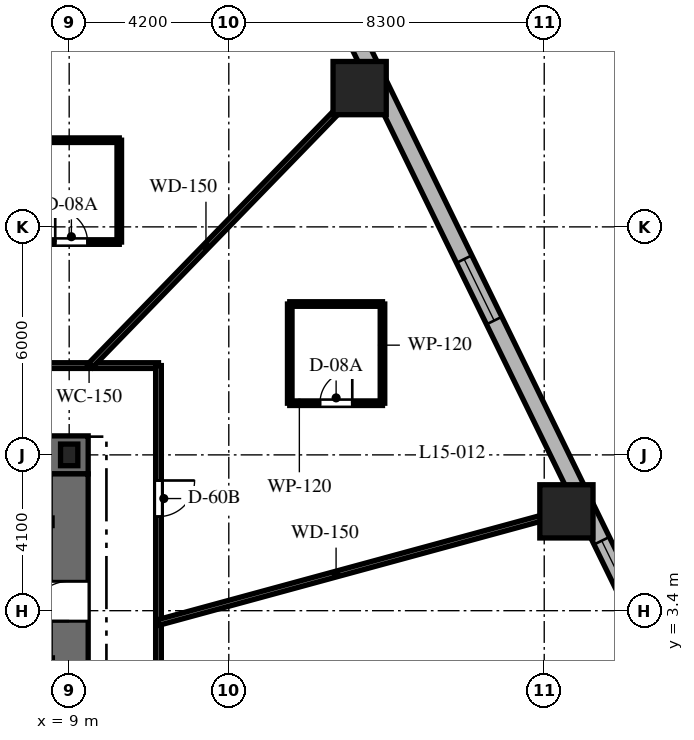
"""IFC4 building model, lengths in metres.
Left out: names, types, materials, properties, quantities, classifications, styles, units other than length and angle.
Written with IfcOpenShell. Run it as: python <this file> out.ifc"""

import sys

from ifc_helpers import new_model, si_unit, direction, frame, frame_2d, origin, origin_2d, place, context, subcontext, project, spatial, rectangle, i_section, extrude, element, fill, save


model = new_model("IFC4")
c1 = context("Model", 3, precision=1e-05, world=origin(), true_north=direction((0.0, 1.0)))
c2 = subcontext(c1, "Body", "Model", "MODEL_VIEW")
j1 = project(units=[si_unit("LENGTHUNIT", "METRE"), si_unit("PLANEANGLEUNIT", "RADIAN")], contexts=[c1])
p1 = place(None, origin())
s1 = spatial("IfcSite", under=j1, at=p1, CompositionType="ELEMENT")
p2 = place(p1, origin())
s2 = spatial("IfcBuilding", under=s1, at=p2, CompositionType="ELEMENT")
p3 = place(p2, frame((0.0, 0.0, 67.5)))
s3 = spatial("IfcBuildingStorey", under=s2, at=p3, CompositionType="ELEMENT", Elevation=67.5)
p4 = place(p3, frame((1.85, 7.5, 0.0), z_axis=(0.0, 0.0, 1.0), x_axis=(1.0, 0.0, 0.0)))
e1 = element("IfcWall", 1, at=p4, inside=s3, PredefinedType="SHEAR", context=c2, shape_type="SweptSolid", body=[
    extrude(rectangle(XDim=7.65, YDim=1.0, at=frame_2d((3.825, 0.0))), origin(), (0.0, 0.0, 1.0), 3.7),
])
p5 = place(p3, frame((9.0, -7.0, 0.0), z_axis=(0.0, 0.0, 1.0), x_axis=(0.0, 1.0, 0.0)))
e2 = element("IfcWall", 2, at=p5, inside=s3, PredefinedType="SHEAR", context=c2, shape_type="SweptSolid", body=[
    extrude(rectangle(XDim=14.0, YDim=1.0, at=frame_2d((7.0, 0.0))), origin(), (0.0, 0.0, 1.0), 3.7),
])
p6 = place(p5, frame((10.125, 0.0, 0.0)))
e3 = element("IfcOpeningElement", 3, at=p6, cuts=e2, PredefinedType="OPENING", context=c2, shape_type="SweptSolid", body=[
    extrude(rectangle(XDim=1.05, YDim=2.15, at=frame_2d((0.525, 1.075))), frame((0.0, 0.51, 0.0), z_axis=(0.0, -1.0, 0.0), x_axis=(1.0, 0.0, 0.0)), (0.0, 0.0, 1.0), 1.02),
])
p7 = place(p3, frame((8.458, -6.985, 0.0), z_axis=(0.0, 0.0, 1.0), x_axis=(0.0, 1.0, 0.0)))
e4 = element("IfcWall", 4, at=p7, inside=s3, PredefinedType="SHEAR", context=c2, shape_type="SweptSolid", body=[
    extrude(rectangle(XDim=9.143, YDim=0.2, at=frame_2d((4.572, 0.0))), origin(), (0.0, 0.0, 1.0), 3.7),
])
p8 = place(p3, frame((9.0, 7.5, 0.0), z_axis=(0.0, 0.0, 1.0), x_axis=(1.0, 0.0, 0.0)))
e5 = element("IfcColumn", 5, at=p8, inside=s3, PredefinedType="COLUMN", context=c2, shape_type="SweptSolid", body=[
    extrude(i_section(OverallWidth=0.454, OverallDepth=0.569, WebThickness=0.078, FlangeThickness=0.125, at=origin_2d()), origin(), (0.0, 0.0, 1.0), 3.7),
])
for number, where, z_axis, x_axis in (
    (6, (22.084, 6.014, 0.0), (0.0, 0.0, 1.0), (1.0, 0.0, 0.0)),
    (7, (16.643, 17.152, 0.0), (0.0, 0.0, 1.0), (1.0, 0.0, 0.0)),
):
    element("IfcColumn", number, at=place(p3, frame(where, z_axis=z_axis, x_axis=x_axis)), inside=s3, PredefinedType="COLUMN", context=c2, shape_type="SweptSolid", body=[
        extrude(rectangle(XDim=1.4, YDim=1.4, at=origin_2d()), origin(), (0.0, 0.0, 1.0), 3.7),
    ])
p9 = place(p3, frame((24.336, 2.532, 0.0), z_axis=(0.0, 0.0, 1.0), x_axis=(-0.438931326393, 0.898520612291, 0.0)))
e8 = element("IfcWall", 8, at=p9, inside=s3, PredefinedType="SOLIDWALL", context=c2, shape_type="SweptSolid", body=[
    extrude(rectangle(XDim=20.623, YDim=0.45, at=frame_2d((10.312, 0.0))), origin(), (0.0, 0.0, 1.0), 3.4),
])
p10 = place(p9, frame((9.462, 0.0, 0.8)))
e9 = element("IfcOpeningElement", 9, at=p10, cuts=e8, PredefinedType="OPENING", context=c2, shape_type="SweptSolid", body=[
    extrude(rectangle(XDim=1.8, YDim=1.8, at=frame_2d((0.9, 0.9))), frame((0.0, 0.235, 0.0), z_axis=(0.0, -1.0, 0.0), x_axis=(1.0, 0.0, 0.0)), (0.0, 0.0, 1.0), 0.47),
])
p11 = place(p9, frame((17.66, 0.0, 0.8)))
e10 = element("IfcOpeningElement", 10, at=p11, cuts=e8, PredefinedType="OPENING", context=c2, shape_type="SweptSolid", body=[
    extrude(rectangle(XDim=1.8, YDim=1.8, at=frame_2d((0.9, 0.9))), frame((0.0, 0.235, 0.0), z_axis=(0.0, -1.0, 0.0), x_axis=(1.0, 0.0, 0.0)), (0.0, 0.0, 1.0), 0.47),
])
p12 = place(p9, frame((1.214, 0.0, 0.8)))
e11 = element("IfcOpeningElement", 11, at=p12, cuts=e8, PredefinedType="OPENING", context=c2, shape_type="SweptSolid", body=[
    extrude(rectangle(XDim=1.8, YDim=1.8, at=frame_2d((0.9, 0.9))), frame((0.0, 0.235, 0.0), z_axis=(0.0, -1.0, 0.0), x_axis=(1.0, 0.0, 0.0)), (0.0, 0.0, 1.0), 0.47),
])
p13 = place(p3, frame((-11.35, 9.85, 0.0), z_axis=(0.0, 0.0, 1.0), x_axis=(1.0, 0.0, 0.0)))
e12 = element("IfcWall", 12, at=p13, inside=s3, PredefinedType="PARTITIONING", context=c2, shape_type="SweptSolid", body=[
    extrude(rectangle(XDim=22.7, YDim=0.15, at=frame_2d((11.35, 0.0))), origin(), (0.0, 0.0, 1.0), 2.84),
])
p14 = place(p13, frame((17.225, 0.0, 0.0)))
e13 = element("IfcOpeningElement", 13, at=p14, cuts=e12, PredefinedType="OPENING", context=c2, shape_type="SweptSolid", body=[
    extrude(rectangle(XDim=0.95, YDim=2.03, at=frame_2d((0.475, 1.015))), frame((0.0, 0.085, 0.0), z_axis=(0.0, -1.0, 0.0), x_axis=(1.0, 0.0, 0.0)), (0.0, 0.0, 1.0), 0.17),
])
p15 = place(p13, frame((12.415, 0.0, 0.0)))
e14 = element("IfcOpeningElement", 14, at=p15, cuts=e12, PredefinedType="OPENING", context=c2, shape_type="SweptSolid", body=[
    extrude(rectangle(XDim=0.95, YDim=2.03, at=frame_2d((0.475, 1.015))), frame((0.0, 0.085, 0.0), z_axis=(0.0, -1.0, 0.0), x_axis=(1.0, 0.0, 0.0)), (0.0, 0.0, 1.0), 0.17),
])
p16 = place(p13, frame((8.925, 0.0, 0.0)))
e15 = element("IfcOpeningElement", 15, at=p16, cuts=e12, PredefinedType="OPENING", context=c2, shape_type="SweptSolid", body=[
    extrude(rectangle(XDim=0.95, YDim=2.03, at=frame_2d((0.475, 1.015))), frame((0.0, 0.085, 0.0), z_axis=(0.0, -1.0, 0.0), x_axis=(1.0, 0.0, 0.0)), (0.0, 0.0, 1.0), 0.17),
])
p17 = place(p13, frame((3.369, 0.0, 0.0)))
e16 = element("IfcOpeningElement", 16, at=p17, cuts=e12, PredefinedType="OPENING", context=c2, shape_type="SweptSolid", body=[
    extrude(rectangle(XDim=0.95, YDim=2.03, at=frame_2d((0.475, 1.015))), frame((0.0, 0.085, 0.0), z_axis=(0.0, -1.0, 0.0), x_axis=(1.0, 0.0, 0.0)), (0.0, 0.0, 1.0), 0.17),
])
p18 = place(p3, frame((11.35, 9.85, 0.0), z_axis=(0.0, 0.0, 1.0), x_axis=(0.0, -1.0, 0.0)))
e17 = element("IfcWall", 17, at=p18, inside=s3, PredefinedType="PARTITIONING", context=c2, shape_type="SweptSolid", body=[
    extrude(rectangle(XDim=19.7, YDim=0.15, at=frame_2d((9.85, 0.0))), origin(), (0.0, 0.0, 1.0), 2.84),
])
p19 = place(p18, frame((3.024, 0.0, 0.0)))
e18 = element("IfcOpeningElement", 18, at=p19, cuts=e17, PredefinedType="OPENING", context=c2, shape_type="SweptSolid", body=[
    extrude(rectangle(XDim=0.95, YDim=2.03, at=frame_2d((0.475, 1.015))), frame((0.0, 0.085, 0.0), z_axis=(0.0, -1.0, 0.0), x_axis=(1.0, 0.0, 0.0)), (0.0, 0.0, 1.0), 0.17),
])
p20 = place(p18, frame((15.191, 0.0, 0.0)))
e19 = element("IfcOpeningElement", 19, at=p20, cuts=e17, PredefinedType="OPENING", context=c2, shape_type="SweptSolid", body=[
    extrude(rectangle(XDim=0.95, YDim=2.03, at=frame_2d((0.475, 1.015))), frame((0.0, 0.085, 0.0), z_axis=(0.0, -1.0, 0.0), x_axis=(1.0, 0.0, 0.0)), (0.0, 0.0, 1.0), 0.17),
])
p21 = place(p18, frame((8.838, 0.0, 0.0)))
e20 = element("IfcOpeningElement", 20, at=p21, cuts=e17, PredefinedType="OPENING", context=c2, shape_type="SweptSolid", body=[
    extrude(rectangle(XDim=0.95, YDim=2.03, at=frame_2d((0.475, 1.015))), frame((0.0, 0.085, 0.0), z_axis=(0.0, -1.0, 0.0), x_axis=(1.0, 0.0, 0.0)), (0.0, 0.0, 1.0), 0.17),
])
p22 = place(p3, frame((11.35, 3.091, 0.0), z_axis=(0.0, 0.0, 1.0), x_axis=(0.964859685283, 0.262765651704, 0.0)))
e21 = element("IfcWall", 21, at=p22, inside=s3, PredefinedType="PARTITIONING", context=c2, shape_type="SweptSolid", body=[
    extrude(rectangle(XDim=11.629, YDim=0.15, at=frame_2d((5.814, 0.0))), origin(), (0.0, 0.0, 1.0), 2.54),
])
p23 = place(p3, frame((9.558, 9.85, 0.0), z_axis=(0.0, 0.0, 1.0), x_axis=(0.69638346089, 0.717669893056, 0.0)))
e22 = element("IfcWall", 22, at=p23, inside=s3, PredefinedType="PARTITIONING", context=c2, shape_type="SweptSolid", body=[
    extrude(rectangle(XDim=10.701, YDim=0.15, at=frame_2d((5.351, 0.0))), origin(), (0.0, 0.0, 1.0), 2.54),
])
p24 = place(p3, frame((14.804, 8.86, 0.0), z_axis=(0.0, 0.0, 1.0), x_axis=(1.0, 0.0, 0.0)))
e23 = element("IfcWall", 23, at=p24, inside=s3, PredefinedType="PARTITIONING", context=c2, shape_type="SweptSolid", body=[
    extrude(rectangle(XDim=2.44, YDim=0.12, at=frame_2d((1.22, 0.0))), origin(), (0.0, 0.0, 1.0), 2.927),
])
p25 = place(p24, frame((0.795, 0.0, 0.0)))
e24 = element("IfcOpeningElement", 24, at=p25, cuts=e23, PredefinedType="OPENING", context=c2, shape_type="SweptSolid", body=[
    extrude(rectangle(XDim=0.85, YDim=2.03, at=frame_2d((0.425, 1.015))), frame((0.0, 0.07, 0.0), z_axis=(0.0, -1.0, 0.0), x_axis=(1.0, 0.0, 0.0)), (0.0, 0.0, 1.0), 0.14),
])
p26 = place(p3, frame((17.244, 8.86, 0.0), z_axis=(0.0, 0.0, 1.0), x_axis=(0.0, 1.0, 0.0)))
e25 = element("IfcWall", 25, at=p26, inside=s3, PredefinedType="PARTITIONING", context=c2, shape_type="SweptSolid", body=[
    extrude(rectangle(XDim=2.61, YDim=0.12, at=frame_2d((1.305, 0.0))), origin(), (0.0, 0.0, 1.0), 3.4),
])
p27 = place(p3, frame((17.244, 11.47, 0.0), z_axis=(0.0, 0.0, 1.0), x_axis=(-1.0, 0.0, 0.0)))
e26 = element("IfcWall", 26, at=p27, inside=s3, PredefinedType="PARTITIONING", context=c2, shape_type="SweptSolid", body=[
    extrude(rectangle(XDim=2.44, YDim=0.12, at=frame_2d((1.22, 0.0))), origin(), (0.0, 0.0, 1.0), 2.927),
])
p28 = place(p3, frame((14.804, 11.47, 0.0), z_axis=(0.0, 0.0, 1.0), x_axis=(0.0, -1.0, 0.0)))
e27 = element("IfcWall", 27, at=p28, inside=s3, PredefinedType="PARTITIONING", context=c2, shape_type="SweptSolid", body=[
    extrude(rectangle(XDim=2.61, YDim=0.12, at=frame_2d((1.305, 0.0))), origin(), (0.0, 0.0, 1.0), 3.4),
])
p29 = place(p3, frame((7.798, 13.101, 0.0), z_axis=(0.0, 0.0, 1.0), x_axis=(1.0, 0.0, 0.0)))
e28 = element("IfcWall", 28, at=p29, inside=s3, PredefinedType="PARTITIONING", context=c2, shape_type="SweptSolid", body=[
    extrude(rectangle(XDim=2.52, YDim=0.12, at=frame_2d((1.26, 0.0))), origin(), (0.0, 0.0, 1.0), 2.84),
])
p30 = place(p29, frame((0.835, 0.0, 0.0)))
e29 = element("IfcOpeningElement", 29, at=p30, cuts=e28, PredefinedType="OPENING", context=c2, shape_type="SweptSolid", body=[
    extrude(rectangle(XDim=0.85, YDim=2.03, at=frame_2d((0.425, 1.015))), frame((0.0, 0.07, 0.0), z_axis=(0.0, -1.0, 0.0), x_axis=(1.0, 0.0, 0.0)), (0.0, 0.0, 1.0), 0.14),
])
p31 = place(p3, frame((10.318, 13.101, 0.0), z_axis=(0.0, 0.0, 1.0), x_axis=(0.0, 1.0, 0.0)))
e30 = element("IfcWall", 30, at=p31, inside=s3, PredefinedType="PARTITIONING", context=c2, shape_type="SweptSolid", body=[
    extrude(rectangle(XDim=2.68, YDim=0.12, at=frame_2d((1.34, 0.0))), origin(), (0.0, 0.0, 1.0), 3.4),
])
p32 = place(p3, frame((10.318, 15.781, 0.0), z_axis=(0.0, 0.0, 1.0), x_axis=(-1.0, 0.0, 0.0)))
e31 = element("IfcWall", 31, at=p32, inside=s3, PredefinedType="PARTITIONING", context=c2, shape_type="SweptSolid", body=[
    extrude(rectangle(XDim=2.52, YDim=0.12, at=frame_2d((1.26, 0.0))), origin(), (0.0, 0.0, 1.0), 2.84),
])
p33 = place(p10, origin())
e32 = element("IfcWindow", 32, at=p33, inside=s3, PartitioningType="SINGLE_PANEL", PredefinedType="WINDOW", context=c2, shape_type="SweptSolid", body=[
    extrude(rectangle(XDim=1.8, YDim=1.8, at=frame_2d((0.9, 0.9))), frame((0.0, 0.03, 0.0), z_axis=(0.0, -1.0, 0.0), x_axis=(1.0, 0.0, 0.0)), (0.0, 0.0, 1.0), 0.06),
])
fill(e9, e32)
p34 = place(p12, origin())
e33 = element("IfcWindow", 33, at=p34, inside=s3, PartitioningType="SINGLE_PANEL", PredefinedType="WINDOW", context=c2, shape_type="SweptSolid", body=[
    extrude(rectangle(XDim=1.8, YDim=1.8, at=frame_2d((0.9, 0.9))), frame((0.0, 0.03, 0.0), z_axis=(0.0, -1.0, 0.0), x_axis=(1.0, 0.0, 0.0)), (0.0, 0.0, 1.0), 0.06),
])
fill(e11, e33)
p35 = place(p6, origin())
e34 = element("IfcDoor", 34, at=p35, inside=s3, OperationType="SINGLE_SWING_LEFT", PredefinedType="DOOR", context=c2, shape_type="SweptSolid", body=[
    extrude(rectangle(XDim=1.05, YDim=2.15, at=frame_2d((0.525, 1.075))), frame((0.0, 0.025, 0.0), z_axis=(0.0, -1.0, 0.0), x_axis=(1.0, 0.0, 0.0)), (0.0, 0.0, 1.0), 0.05),
])
fill(e3, e34)
p36 = place(p19, origin())
e35 = element("IfcDoor", 35, at=p36, inside=s3, OperationType="SINGLE_SWING_LEFT", PredefinedType="DOOR", context=c2, shape_type="SweptSolid", body=[
    extrude(rectangle(XDim=0.95, YDim=2.03, at=frame_2d((0.475, 1.015))), frame((0.0, 0.025, 0.0), z_axis=(0.0, -1.0, 0.0), x_axis=(1.0, 0.0, 0.0)), (0.0, 0.0, 1.0), 0.05),
])
fill(e18, e35)
p37 = place(p25, origin())
e36 = element("IfcDoor", 36, at=p37, inside=s3, OperationType="SINGLE_SWING_RIGHT", PredefinedType="DOOR", context=c2, shape_type="SweptSolid", body=[
    extrude(rectangle(XDim=0.85, YDim=2.03, at=frame_2d((0.425, 1.015))), frame((0.0, 0.025, 0.0), z_axis=(0.0, -1.0, 0.0), x_axis=(1.0, 0.0, 0.0)), (0.0, 0.0, 1.0), 0.05),
])
fill(e24, e36)
p38 = place(p30, origin())
e37 = element("IfcDoor", 37, at=p38, inside=s3, OperationType="SINGLE_SWING_LEFT", PredefinedType="DOOR", context=c2, shape_type="SweptSolid", body=[
    extrude(rectangle(XDim=0.85, YDim=2.03, at=frame_2d((0.425, 1.015))), frame((0.0, 0.025, 0.0), z_axis=(0.0, -1.0, 0.0), x_axis=(1.0, 0.0, 0.0)), (0.0, 0.0, 1.0), 0.05),
])
fill(e29, e37)
save(model, sys.argv[1])
